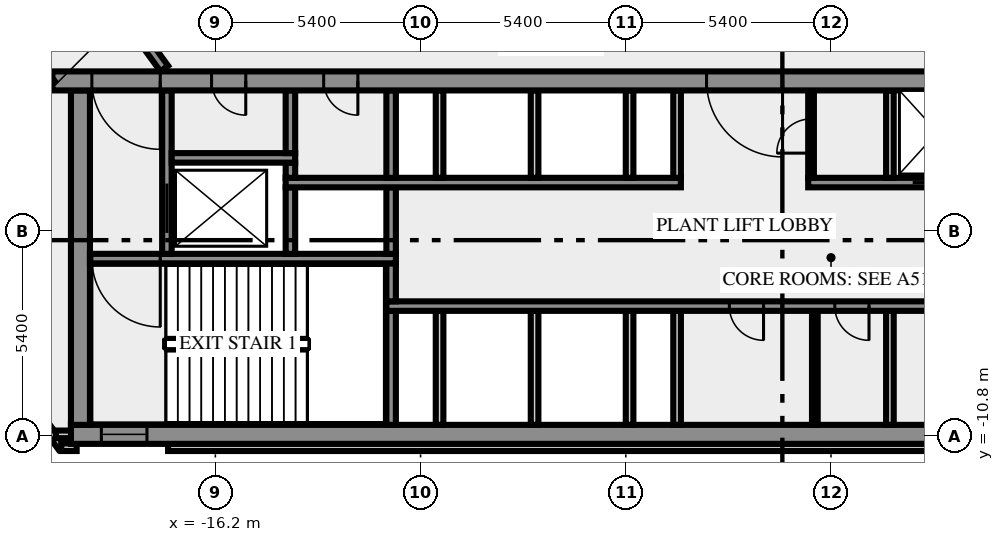
"""IFC4 building model, lengths in metres.
Left out: names, types, materials, properties, quantities, classifications, styles, units other than length and angle.
Written with IfcOpenShell. Run it as: python <this file> out.ifc"""

import sys

from ifc_helpers import new_model, si_unit, direction, frame, frame_2d, origin, place, context, subcontext, project, spatial, rectangle, extrude, element, fill, save


model = new_model("IFC4")
c1 = context("Model", 3, precision=1e-05, world=origin(), true_north=direction((0.0, 1.0)))
c2 = subcontext(c1, "Body", "Model", "MODEL_VIEW")
j1 = project(units=[si_unit("LENGTHUNIT", "METRE"), si_unit("PLANEANGLEUNIT", "RADIAN")], contexts=[c1])
p1 = place(None, origin())
s1 = spatial("IfcSite", under=j1, at=p1, CompositionType="ELEMENT")
p2 = place(p1, origin())
s2 = spatial("IfcBuilding", under=s1, at=p2, CompositionType="ELEMENT")
p3 = place(p2, frame((0.0, 0.0, 301.0)))
s3 = spatial("IfcBuildingStorey", under=s2, at=p3, CompositionType="ELEMENT", Elevation=301.0)
p4 = place(p3, frame((-21.833, -8.909, 0.0), z_axis=(0.0, 0.0, 1.0), x_axis=(0.587766567315, -0.809030569476, 0.0)))
e1 = element("IfcWall", 1, at=p4, inside=s3, PredefinedType="SOLIDWALL", context=c2, shape_type="SweptSolid", body=[
    extrude(rectangle(XDim=2.688, YDim=0.2, at=frame_2d((1.344, 0.0))), origin(), (0.0, 0.0, 1.0), 5.65),
])
p5 = place(p3, frame((-20.256, -11.088, 0.0), z_axis=(0.0, 0.0, 1.0), x_axis=(1.0, 0.0, 0.0)))
e2 = element("IfcWall", 2, at=p5, inside=s3, PredefinedType="SOLIDWALL", context=c2, shape_type="SweptSolid", body=[
    extrude(rectangle(XDim=0.406, YDim=0.2, at=frame_2d((0.203, 0.0))), origin(), (0.0, 0.0, 1.0), 5.65),
])
p6 = place(p3, frame((-17.444, -11.088, 0.0), z_axis=(0.0, 0.0, 1.0), x_axis=(1.0, 0.0, 0.0)))
e3 = element("IfcWall", 3, at=p6, inside=s3, PredefinedType="SOLIDWALL", context=c2, shape_type="SweptSolid", body=[
    extrude(rectangle(XDim=34.888, YDim=0.2, at=frame_2d((17.444, 0.0))), origin(), (0.0, 0.0, 1.0), 5.65),
])
p7 = place(p3, frame((-19.98, -10.75, 0.0), z_axis=(0.0, 0.0, 1.0), x_axis=(-1.0, 0.0, 0.0)))
e4 = element("IfcWall", 4, at=p7, inside=s3, PredefinedType="SOLIDWALL", context=c2, shape_type="SweptSolid", body=[
    extrude(rectangle(XDim=0.417, YDim=0.2, at=frame_2d((0.208, 0.0))), origin(), (0.0, 0.0, 1.0), 5.65),
])
p8 = place(p3, frame((-20.0, -10.75, 0.0), z_axis=(0.0, 0.0, 1.0), x_axis=(1.0, 0.0, 0.0)))
e5 = element("IfcWall", 5, at=p8, inside=s3, PredefinedType="SHEAR", context=c2, shape_type="SweptSolid", body=[
    extrude(rectangle(XDim=40.0, YDim=0.5, at=frame_2d((20.0, 0.0))), origin(), (0.0, 0.0, 1.0), 5.65),
])
p9 = place(p8, frame((0.8, 0.0, 1.0)))
e6 = element("IfcOpeningElement", 6, at=p9, cuts=e5, PredefinedType="OPENING", context=c2, shape_type="SweptSolid", body=[
    extrude(rectangle(XDim=1.2, YDim=1.2, at=frame_2d((0.6, 0.6))), frame((0.0, 0.26, 0.0), z_axis=(0.0, -1.0, 0.0), x_axis=(1.0, 0.0, 0.0)), (0.0, 0.0, 1.0), 0.52),
])
p10 = place(p8, frame((38.0, 0.0, 1.0)))
e7 = element("IfcOpeningElement", 7, at=p10, cuts=e5, PredefinedType="OPENING", context=c2, shape_type="SweptSolid", body=[
    extrude(rectangle(XDim=1.2, YDim=1.2, at=frame_2d((0.6, 0.6))), frame((0.0, 0.26, 0.0), z_axis=(0.0, -1.0, 0.0), x_axis=(1.0, 0.0, 0.0)), (0.0, 0.0, 1.0), 0.52),
])
p11 = place(p3, frame((-19.75, -10.5, 0.0), z_axis=(0.0, 0.0, 1.0), x_axis=(0.0, 1.0, 0.0)))
e8 = element("IfcWall", 8, at=p11, inside=s3, PredefinedType="SHEAR", context=c2, shape_type="SweptSolid", body=[
    extrude(rectangle(XDim=8.8, YDim=0.5, at=frame_2d((4.4, 0.0))), origin(), (0.0, 0.0, 1.0), 5.65),
])
p12 = place(p3, frame((-11.575, -10.5, 0.0), z_axis=(0.0, 0.0, 1.0), x_axis=(0.0, 1.0, 0.0)))
e9 = element("IfcWall", 9, at=p12, inside=s3, PredefinedType="SHEAR", context=c2, shape_type="SweptSolid", body=[
    extrude(rectangle(XDim=3.0, YDim=0.25, at=frame_2d((1.5, 0.0))), origin(), (0.0, 0.0, 1.0), 5.65),
])
for number, where, z_axis, x_axis in (
    (10, (-10.3, -10.5, 0.0), (0.0, 0.0, 1.0), (0.0, 1.0, 0.0)),
    (11, (-7.8, -10.5, 0.0), (0.0, 0.0, 1.0), (0.0, 1.0, 0.0)),
    (12, (-5.3, -10.5, 0.0), (0.0, 0.0, 1.0), (0.0, 1.0, 0.0)),
    (13, (-4.05, -10.5, 0.0), (0.0, 0.0, 1.0), (0.0, 1.0, 0.0)),
):
    element("IfcWall", number, at=place(p3, frame(where, z_axis=z_axis, x_axis=x_axis)), inside=s3, PredefinedType="SOLIDWALL", context=c2, shape_type="SweptSolid", body=[
        extrude(rectangle(XDim=3.0, YDim=0.2, at=frame_2d((1.5, 0.0))), origin(), (0.0, 0.0, 1.0), 5.65),
    ])
p13 = place(p3, frame((-0.425, -10.5, 0.0), z_axis=(0.0, 0.0, 1.0), x_axis=(0.0, 1.0, 0.0)))
e14 = element("IfcWall", 14, at=p13, inside=s3, PredefinedType="PARTITIONING", context=c2, shape_type="SweptSolid", body=[
    extrude(rectangle(XDim=3.0, YDim=0.15, at=frame_2d((1.5, 0.0))), origin(), (0.0, 0.0, 1.0), 5.65),
])
p14 = place(p3, frame((1.55, -10.5, 0.0), z_axis=(0.0, 0.0, 1.0), x_axis=(0.0, 1.0, 0.0)))
e15 = element("IfcWall", 15, at=p14, inside=s3, PredefinedType="SOLIDWALL", context=c2, shape_type="SweptSolid", body=[
    extrude(rectangle(XDim=3.0, YDim=0.2, at=frame_2d((1.5, 0.0))), origin(), (0.0, 0.0, 1.0), 5.65),
])
p15 = place(p3, frame((11.7, -7.375, 0.0), z_axis=(0.0, 0.0, 1.0), x_axis=(-1.0, 0.0, 0.0)))
e16 = element("IfcWall", 16, at=p15, inside=s3, PredefinedType="SHEAR", context=c2, shape_type="SweptSolid", body=[
    extrude(rectangle(XDim=23.4, YDim=0.25, at=frame_2d((11.7, 0.0))), origin(), (0.0, 0.0, 1.0), 5.65),
])
p16 = place(p15, frame((13.475, 0.0, 0.0)))
e17 = element("IfcOpeningElement", 17, at=p16, cuts=e16, PredefinedType="OPENING", context=c2, shape_type="SweptSolid", body=[
    extrude(rectangle(XDim=0.9, YDim=2.1, at=frame_2d((0.45, 1.05))), frame((0.0, 0.135, 0.0), z_axis=(0.0, -1.0, 0.0), x_axis=(1.0, 0.0, 0.0)), (0.0, 0.0, 1.0), 0.27),
])
p17 = place(p15, frame((10.7, 0.0, 0.0)))
e18 = element("IfcOpeningElement", 18, at=p17, cuts=e16, PredefinedType="OPENING", context=c2, shape_type="SweptSolid", body=[
    extrude(rectangle(XDim=0.9, YDim=2.1, at=frame_2d((0.45, 1.05))), frame((0.0, 0.135, 0.0), z_axis=(0.0, -1.0, 0.0), x_axis=(1.0, 0.0, 0.0)), (0.0, 0.0, 1.0), 0.27),
])
p18 = place(p15, frame((7.6, 0.0, 0.0)))
e19 = element("IfcOpeningElement", 19, at=p18, cuts=e16, PredefinedType="OPENING", context=c2, shape_type="SweptSolid", body=[
    extrude(rectangle(XDim=0.9, YDim=2.1, at=frame_2d((0.45, 1.05))), frame((0.0, 0.135, 0.0), z_axis=(0.0, -1.0, 0.0), x_axis=(1.0, 0.0, 0.0)), (0.0, 0.0, 1.0), 0.27),
])
p19 = place(p15, frame((2.338, 0.0, 0.0)))
e20 = element("IfcOpeningElement", 20, at=p19, cuts=e16, PredefinedType="OPENING", context=c2, shape_type="SweptSolid", body=[
    extrude(rectangle(XDim=0.9, YDim=2.1, at=frame_2d((0.45, 1.05))), frame((0.0, 0.135, 0.0), z_axis=(0.0, -1.0, 0.0), x_axis=(1.0, 0.0, 0.0)), (0.0, 0.0, 1.0), 0.27),
])
p20 = place(p3, frame((-11.575, -7.25, 0.0), z_axis=(0.0, 0.0, 1.0), x_axis=(0.0, 1.0, 0.0)))
e21 = element("IfcWall", 21, at=p20, inside=s3, PredefinedType="SHEAR", context=c2, shape_type="SweptSolid", body=[
    extrude(rectangle(XDim=1.0, YDim=0.25, at=frame_2d((0.5, 0.0))), origin(), (0.0, 0.0, 1.0), 5.65),
])
p21 = place(p3, frame((-11.45, -6.125, 0.0), z_axis=(0.0, 0.0, 1.0), x_axis=(-1.0, 0.0, 0.0)))
e22 = element("IfcWall", 22, at=p21, inside=s3, PredefinedType="SHEAR", context=c2, shape_type="SweptSolid", body=[
    extrude(rectangle(XDim=8.05, YDim=0.25, at=frame_2d((4.025, 0.0))), origin(), (0.0, 0.0, 1.0), 5.65),
])
p22 = place(p21, frame((6.2, 0.0, 0.0)))
e23 = element("IfcOpeningElement", 23, at=p22, cuts=e22, PredefinedType="OPENING", context=c2, shape_type="SweptSolid", body=[
    extrude(rectangle(XDim=1.8, YDim=2.1, at=frame_2d((0.9, 1.05))), frame((0.0, 0.135, 0.0), z_axis=(0.0, -1.0, 0.0), x_axis=(1.0, 0.0, 0.0)), (0.0, 0.0, 1.0), 0.27),
])
p23 = place(p3, frame((-17.475, -6.0, 0.0), z_axis=(0.0, 0.0, 1.0), x_axis=(0.0, 1.0, 0.0)))
e24 = element("IfcWall", 24, at=p23, inside=s3, PredefinedType="SHEAR", context=c2, shape_type="SweptSolid", body=[
    extrude(rectangle(XDim=4.3, YDim=0.25, at=frame_2d((2.15, 0.0))), origin(), (0.0, 0.0, 1.0), 5.65),
])
p24 = place(p23, frame((0.55, 0.0, 0.0)))
e25 = element("IfcOpeningElement", 25, at=p24, cuts=e24, PredefinedType="OPENING", context=c2, shape_type="SweptSolid", body=[
    extrude(rectangle(XDim=1.3, YDim=2.1, at=frame_2d((0.65, 1.05))), frame((0.0, 0.135, 0.0), z_axis=(0.0, -1.0, 0.0), x_axis=(1.0, 0.0, 0.0)), (0.0, 0.0, 1.0), 0.27),
])
for number, where, z_axis, x_axis in (
    (26, (-14.225, -6.0, 0.0), (0.0, 0.0, 1.0), (0.0, 1.0, 0.0)),
    (27, (-11.575, -6.0, 0.0), (0.0, 0.0, 1.0), (0.0, 1.0, 0.0)),
):
    element("IfcWall", number, at=place(p3, frame(where, z_axis=z_axis, x_axis=x_axis)), inside=s3, PredefinedType="SHEAR", context=c2, shape_type="SweptSolid", body=[
        extrude(rectangle(XDim=1.75, YDim=0.25, at=frame_2d((0.875, 0.0))), origin(), (0.0, 0.0, 1.0), 5.65),
    ])
p25 = place(p3, frame((-14.35, -4.125, 0.0), z_axis=(0.0, 0.0, 1.0), x_axis=(1.0, 0.0, 0.0)))
e28 = element("IfcWall", 28, at=p25, inside=s3, PredefinedType="SHEAR", context=c2, shape_type="SweptSolid", body=[
    extrude(rectangle(XDim=10.4, YDim=0.25, at=frame_2d((5.2, 0.0))), origin(), (0.0, 0.0, 1.0), 5.65),
])
p26 = place(p3, frame((-0.6, -4.125, 0.0), z_axis=(0.0, 0.0, 1.0), x_axis=(1.0, 0.0, 0.0)))
e29 = element("IfcWall", 29, at=p26, inside=s3, PredefinedType="SHEAR", context=c2, shape_type="SweptSolid", body=[
    extrude(rectangle(XDim=14.95, YDim=0.25, at=frame_2d((7.475, 0.0))), origin(), (0.0, 0.0, 1.0), 5.65),
])
p27 = place(p26, frame((2.75, 0.0, 0.0)))
e30 = element("IfcOpeningElement", 30, at=p27, cuts=e29, PredefinedType="OPENING", context=c2, shape_type="SweptSolid", body=[
    extrude(rectangle(XDim=1.3, YDim=2.1, at=frame_2d((0.65, 1.05))), frame((0.0, 0.135, 0.0), z_axis=(0.0, -1.0, 0.0), x_axis=(1.0, 0.0, 0.0)), (0.0, 0.0, 1.0), 0.27),
])
p28 = place(p3, frame((-14.225, -4.0, 0.0), z_axis=(0.0, 0.0, 1.0), x_axis=(0.0, 1.0, 0.0)))
e31 = element("IfcWall", 31, at=p28, inside=s3, PredefinedType="SHEAR", context=c2, shape_type="SweptSolid", body=[
    extrude(rectangle(XDim=0.4, YDim=0.25, at=frame_2d((0.2, 0.0))), origin(), (0.0, 0.0, 1.0), 5.65),
])
p29 = place(p3, frame((-11.575, -4.0, 0.0), z_axis=(0.0, 0.0, 1.0), x_axis=(0.0, 1.0, 0.0)))
e32 = element("IfcWall", 32, at=p29, inside=s3, PredefinedType="SHEAR", context=c2, shape_type="SweptSolid", body=[
    extrude(rectangle(XDim=2.3, YDim=0.25, at=frame_2d((1.15, 0.0))), origin(), (0.0, 0.0, 1.0), 5.65),
])
for number, where, z_axis, x_axis in (
    (33, (-10.3, -4.0, 0.0), (0.0, 0.0, 1.0), (0.0, 1.0, 0.0)),
    (34, (-7.8, -4.0, 0.0), (0.0, 0.0, 1.0), (0.0, 1.0, 0.0)),
    (35, (-5.3, -4.0, 0.0), (0.0, 0.0, 1.0), (0.0, 1.0, 0.0)),
    (36, (-4.05, -4.0, 0.0), (0.0, 0.0, 1.0), (0.0, 1.0, 0.0)),
):
    element("IfcWall", number, at=place(p3, frame(where, z_axis=z_axis, x_axis=x_axis)), inside=s3, PredefinedType="SOLIDWALL", context=c2, shape_type="SweptSolid", body=[
        extrude(rectangle(XDim=2.3, YDim=0.2, at=frame_2d((1.15, 0.0))), origin(), (0.0, 0.0, 1.0), 5.65),
    ])
p30 = place(p3, frame((-0.525, -4.0, 0.0), z_axis=(0.0, 0.0, 1.0), x_axis=(0.0, 1.0, 0.0)))
e37 = element("IfcWall", 37, at=p30, inside=s3, PredefinedType="PARTITIONING", context=c2, shape_type="SweptSolid", body=[
    extrude(rectangle(XDim=2.3, YDim=0.15, at=frame_2d((1.15, 0.0))), origin(), (0.0, 0.0, 1.0), 5.65),
])
p31 = place(p30, frame((0.65, 0.0, 0.0)))
e38 = element("IfcOpeningElement", 38, at=p31, cuts=e37, PredefinedType="OPENING", context=c2, shape_type="SweptSolid", body=[
    extrude(rectangle(XDim=0.9, YDim=2.1, at=frame_2d((0.45, 1.05))), frame((0.0, 0.085, 0.0), z_axis=(0.0, -1.0, 0.0), x_axis=(1.0, 0.0, 0.0)), (0.0, 0.0, 1.0), 0.17),
])
p32 = place(p3, frame((1.55, -4.0, 0.0), z_axis=(0.0, 0.0, 1.0), x_axis=(0.0, 1.0, 0.0)))
e39 = element("IfcWall", 39, at=p32, inside=s3, PredefinedType="SOLIDWALL", context=c2, shape_type="SweptSolid", body=[
    extrude(rectangle(XDim=2.3, YDim=0.2, at=frame_2d((1.15, 0.0))), origin(), (0.0, 0.0, 1.0), 5.65),
])
p33 = place(p3, frame((-17.35, -3.475, 0.0), z_axis=(0.0, 0.0, 1.0), x_axis=(1.0, 0.0, 0.0)))
e40 = element("IfcWall", 40, at=p33, inside=s3, PredefinedType="SHEAR", context=c2, shape_type="SweptSolid", body=[
    extrude(rectangle(XDim=3.25, YDim=0.25, at=frame_2d((1.625, 0.0))), origin(), (0.0, 0.0, 1.0), 5.65),
])
p34 = place(p3, frame((-14.225, -3.35, 0.0), z_axis=(0.0, 0.0, 1.0), x_axis=(0.0, 1.0, 0.0)))
e41 = element("IfcWall", 41, at=p34, inside=s3, PredefinedType="SHEAR", context=c2, shape_type="SweptSolid", body=[
    extrude(rectangle(XDim=1.65, YDim=0.25, at=frame_2d((0.825, 0.0))), origin(), (0.0, 0.0, 1.0), 5.65),
])
p35 = place(p3, frame((20.49, -1.45, 0.0), z_axis=(0.0, 0.0, 1.0), x_axis=(-1.0, 0.0, 0.0)))
e42 = element("IfcWall", 42, at=p35, inside=s3, PredefinedType="SHEAR", context=c2, shape_type="SweptSolid", body=[
    extrude(rectangle(XDim=40.98, YDim=0.5, at=frame_2d((20.49, 0.0))), origin(), (0.0, 0.0, 1.0), 5.65),
])
p36 = place(p35, frame((38.14, 0.0, 0.0)))
e43 = element("IfcOpeningElement", 43, at=p36, cuts=e42, PredefinedType="OPENING", context=c2, shape_type="SweptSolid", body=[
    extrude(rectangle(XDim=1.8, YDim=2.1, at=frame_2d((0.9, 1.05))), frame((0.0, 0.26, 0.0), z_axis=(0.0, -1.0, 0.0), x_axis=(1.0, 0.0, 0.0)), (0.0, 0.0, 1.0), 0.52),
])
p37 = place(p35, frame((35.89, 0.0, 0.0)))
e44 = element("IfcOpeningElement", 44, at=p37, cuts=e42, PredefinedType="OPENING", context=c2, shape_type="SweptSolid", body=[
    extrude(rectangle(XDim=0.9, YDim=2.1, at=frame_2d((0.45, 1.05))), frame((0.0, 0.26, 0.0), z_axis=(0.0, -1.0, 0.0), x_axis=(1.0, 0.0, 0.0)), (0.0, 0.0, 1.0), 0.52),
])
p38 = place(p35, frame((32.94, 0.0, 0.0)))
e45 = element("IfcOpeningElement", 45, at=p38, cuts=e42, PredefinedType="OPENING", context=c2, shape_type="SweptSolid", body=[
    extrude(rectangle(XDim=0.9, YDim=2.1, at=frame_2d((0.45, 1.05))), frame((0.0, 0.26, 0.0), z_axis=(0.0, -1.0, 0.0), x_axis=(1.0, 0.0, 0.0)), (0.0, 0.0, 1.0), 0.52),
])
p39 = place(p35, frame((21.765, 0.0, 0.0)))
e46 = element("IfcOpeningElement", 46, at=p39, cuts=e42, PredefinedType="OPENING", context=c2, shape_type="SweptSolid", body=[
    extrude(rectangle(XDim=2.0, YDim=2.1, at=frame_2d((1.0, 1.05))), frame((0.0, 0.26, 0.0), z_axis=(0.0, -1.0, 0.0), x_axis=(1.0, 0.0, 0.0)), (0.0, 0.0, 1.0), 0.52),
])
p40 = place(p35, frame((14.903, 0.0, 0.0)))
e47 = element("IfcOpeningElement", 47, at=p40, cuts=e42, PredefinedType="OPENING", context=c2, shape_type="SweptSolid", body=[
    extrude(rectangle(XDim=0.9, YDim=2.1, at=frame_2d((0.45, 1.05))), frame((0.0, 0.26, 0.0), z_axis=(0.0, -1.0, 0.0), x_axis=(1.0, 0.0, 0.0)), (0.0, 0.0, 1.0), 0.52),
])
p41 = place(p35, frame((12.54, 0.0, 0.0)))
e48 = element("IfcOpeningElement", 48, at=p41, cuts=e42, PredefinedType="OPENING", context=c2, shape_type="SweptSolid", body=[
    extrude(rectangle(XDim=0.9, YDim=2.1, at=frame_2d((0.45, 1.05))), frame((0.0, 0.26, 0.0), z_axis=(0.0, -1.0, 0.0), x_axis=(1.0, 0.0, 0.0)), (0.0, 0.0, 1.0), 0.52),
])
p42 = place(p35, frame((9.877, 0.0, 0.0)))
e49 = element("IfcOpeningElement", 49, at=p42, cuts=e42, PredefinedType="OPENING", context=c2, shape_type="SweptSolid", body=[
    extrude(rectangle(XDim=0.9, YDim=2.1, at=frame_2d((0.45, 1.05))), frame((0.0, 0.26, 0.0), z_axis=(0.0, -1.0, 0.0), x_axis=(1.0, 0.0, 0.0)), (0.0, 0.0, 1.0), 0.52),
])
p43 = place(p35, frame((7.14, 0.0, 0.0)))
e50 = element("IfcOpeningElement", 50, at=p43, cuts=e42, PredefinedType="OPENING", context=c2, shape_type="SweptSolid", body=[
    extrude(rectangle(XDim=0.9, YDim=2.1, at=frame_2d((0.45, 1.05))), frame((0.0, 0.26, 0.0), z_axis=(0.0, -1.0, 0.0), x_axis=(1.0, 0.0, 0.0)), (0.0, 0.0, 1.0), 0.52),
])
p44 = place(p35, frame((5.028, 0.0, 0.0)))
e51 = element("IfcOpeningElement", 51, at=p44, cuts=e42, PredefinedType="OPENING", context=c2, shape_type="SweptSolid", body=[
    extrude(rectangle(XDim=0.8, YDim=2.1, at=frame_2d((0.4, 1.05))), frame((0.0, 0.26, 0.0), z_axis=(0.0, -1.0, 0.0), x_axis=(1.0, 0.0, 0.0)), (0.0, 0.0, 1.0), 0.52),
])
p45 = place(p35, frame((3.452, 0.0, 0.0)))
e52 = element("IfcOpeningElement", 52, at=p45, cuts=e42, PredefinedType="OPENING", context=c2, shape_type="SweptSolid", body=[
    extrude(rectangle(XDim=0.8, YDim=2.1, at=frame_2d((0.4, 1.05))), frame((0.0, 0.26, 0.0), z_axis=(0.0, -1.0, 0.0), x_axis=(1.0, 0.0, 0.0)), (0.0, 0.0, 1.0), 0.52),
])
p46 = place(p35, frame((1.04, 0.0, 0.0)))
e53 = element("IfcOpeningElement", 53, at=p46, cuts=e42, PredefinedType="OPENING", context=c2, shape_type="SweptSolid", body=[
    extrude(rectangle(XDim=1.8, YDim=2.1, at=frame_2d((0.9, 1.05))), frame((0.0, 0.26, 0.0), z_axis=(0.0, -1.0, 0.0), x_axis=(1.0, 0.0, 0.0)), (0.0, 0.0, 1.0), 0.52),
])
p47 = place(p3, frame((-20.531, -1.523, 0.0), z_axis=(0.0, 0.0, 1.0), x_axis=(-0.587782114023, 0.809019274452, 0.0)))
e54 = element("IfcWall", 54, at=p47, inside=s3, PredefinedType="SOLIDWALL", context=c2, shape_type="SweptSolid", body=[
    extrude(rectangle(XDim=22.212, YDim=0.25, at=frame_2d((11.106, 0.0))), origin(), (0.0, 0.0, 1.0), 5.65),
])
p48 = place(p47, frame((0.533, 0.0, 0.0)))
e55 = element("IfcOpeningElement", 55, at=p48, cuts=e54, PredefinedType="OPENING", context=c2, shape_type="SweptSolid", body=[
    extrude(rectangle(XDim=1.2, YDim=2.1, at=frame_2d((0.6, 1.05))), frame((0.0, 0.135, 0.0), z_axis=(0.0, -1.0, 0.0), x_axis=(1.0, 0.0, 0.0)), (0.0, 0.0, 1.0), 0.27),
])
p49 = place(p3, frame((-31.387, 17.927, 0.0), z_axis=(0.0, 0.0, 1.0), x_axis=(0.587788830132, -0.80901439491, 0.0)))
e56 = element("IfcWall", 56, at=p49, inside=s3, PredefinedType="SOLIDWALL", context=c2, shape_type="SweptSolid", body=[
    extrude(rectangle(XDim=23.549, YDim=0.25, at=frame_2d((11.775, 0.0))), origin(), (0.0, 0.0, 1.0), 5.65),
])
p50 = place(p49, frame((1.046, 0.0, 0.0)))
e57 = element("IfcOpeningElement", 57, at=p50, cuts=e56, PredefinedType="OPENING", context=c2, shape_type="SweptSolid", body=[
    extrude(rectangle(XDim=1.2, YDim=2.1, at=frame_2d((0.6, 1.05))), frame((0.0, 0.135, 0.0), z_axis=(0.0, -1.0, 0.0), x_axis=(1.0, 0.0, 0.0)), (0.0, 0.0, 1.0), 0.27),
])
p51 = place(p9, origin())
e58 = element("IfcWindow", 58, at=p51, inside=s3, PartitioningType="SINGLE_PANEL", PredefinedType="WINDOW", context=c2, shape_type="SweptSolid", body=[
    extrude(rectangle(XDim=1.2, YDim=1.2, at=frame_2d((0.6, 0.6))), frame((0.0, 0.03, 0.0), z_axis=(0.0, -1.0, 0.0), x_axis=(1.0, 0.0, 0.0)), (0.0, 0.0, 1.0), 0.06),
])
fill(e6, e58)
p52 = place(p16, origin())
e59 = element("IfcDoor", 59, at=p52, inside=s3, OperationType="SINGLE_SWING_RIGHT", PredefinedType="DOOR", context=c2, shape_type="SweptSolid", body=[
    extrude(rectangle(XDim=0.9, YDim=2.1, at=frame_2d((0.45, 1.05))), frame((0.0, 0.025, 0.0), z_axis=(0.0, -1.0, 0.0), x_axis=(1.0, 0.0, 0.0)), (0.0, 0.0, 1.0), 0.05),
])
fill(e17, e59)
p53 = place(p17, origin())
e60 = element("IfcDoor", 60, at=p53, inside=s3, OperationType="SINGLE_SWING_LEFT", PredefinedType="DOOR", context=c2, shape_type="SweptSolid", body=[
    extrude(rectangle(XDim=0.9, YDim=2.1, at=frame_2d((0.45, 1.05))), frame((0.0, 0.025, 0.0), z_axis=(0.0, -1.0, 0.0), x_axis=(1.0, 0.0, 0.0)), (0.0, 0.0, 1.0), 0.05),
])
fill(e18, e60)
p54 = place(p22, origin())
e61 = element("IfcDoor", 61, at=p54, inside=s3, OperationType="DOUBLE_DOOR_SINGLE_SWING", PredefinedType="DOOR", context=c2, shape_type="SweptSolid", body=[
    extrude(rectangle(XDim=1.8, YDim=2.1, at=frame_2d((0.9, 1.05))), frame((0.0, 0.025, 0.0), z_axis=(0.0, -1.0, 0.0), x_axis=(1.0, 0.0, 0.0)), (0.0, 0.0, 1.0), 0.05),
])
fill(e23, e61)
p55 = place(p24, origin())
e62 = element("IfcDoor", 62, at=p55, inside=s3, OperationType="DOUBLE_DOOR_SLIDING", PredefinedType="DOOR", context=c2, shape_type="SweptSolid", body=[
    extrude(rectangle(XDim=1.3, YDim=2.1, at=frame_2d((0.65, 1.05))), frame((0.0, 0.025, 0.0), z_axis=(0.0, -1.0, 0.0), x_axis=(1.0, 0.0, 0.0)), (0.0, 0.0, 1.0), 0.05),
])
fill(e25, e62)
p56 = place(p27, origin())
e63 = element("IfcDoor", 63, at=p56, inside=s3, OperationType="DOUBLE_DOOR_SLIDING", PredefinedType="DOOR", context=c2, shape_type="SweptSolid", body=[
    extrude(rectangle(XDim=1.3, YDim=2.1, at=frame_2d((0.65, 1.05))), frame((0.0, 0.025, 0.0), z_axis=(0.0, -1.0, 0.0), x_axis=(1.0, 0.0, 0.0)), (0.0, 0.0, 1.0), 0.05),
])
fill(e30, e63)
p57 = place(p31, origin())
e64 = element("IfcDoor", 64, at=p57, inside=s3, OperationType="SINGLE_SWING_LEFT", PredefinedType="DOOR", context=c2, shape_type="SweptSolid", body=[
    extrude(rectangle(XDim=0.9, YDim=2.1, at=frame_2d((0.45, 1.05))), frame((0.0, 0.025, 0.0), z_axis=(0.0, -1.0, 0.0), x_axis=(1.0, 0.0, 0.0)), (0.0, 0.0, 1.0), 0.05),
])
fill(e38, e64)
p58 = place(p36, origin())
e65 = element("IfcDoor", 65, at=p58, inside=s3, OperationType="DOUBLE_DOOR_SINGLE_SWING", PredefinedType="DOOR", context=c2, shape_type="SweptSolid", body=[
    extrude(rectangle(XDim=1.8, YDim=2.1, at=frame_2d((0.9, 1.05))), frame((0.0, 0.025, 0.0), z_axis=(0.0, -1.0, 0.0), x_axis=(1.0, 0.0, 0.0)), (0.0, 0.0, 1.0), 0.05),
])
fill(e43, e65)
p59 = place(p37, origin())
e66 = element("IfcDoor", 66, at=p59, inside=s3, OperationType="SINGLE_SWING_RIGHT", PredefinedType="DOOR", context=c2, shape_type="SweptSolid", body=[
    extrude(rectangle(XDim=0.9, YDim=2.1, at=frame_2d((0.45, 1.05))), frame((0.0, 0.025, 0.0), z_axis=(0.0, -1.0, 0.0), x_axis=(1.0, 0.0, 0.0)), (0.0, 0.0, 1.0), 0.05),
])
fill(e44, e66)
p60 = place(p38, origin())
e67 = element("IfcDoor", 67, at=p60, inside=s3, OperationType="SINGLE_SWING_RIGHT", PredefinedType="DOOR", context=c2, shape_type="SweptSolid", body=[
    extrude(rectangle(XDim=0.9, YDim=2.1, at=frame_2d((0.45, 1.05))), frame((0.0, 0.025, 0.0), z_axis=(0.0, -1.0, 0.0), x_axis=(1.0, 0.0, 0.0)), (0.0, 0.0, 1.0), 0.05),
])
fill(e45, e67)
p61 = place(p39, origin())
e68 = element("IfcDoor", 68, at=p61, inside=s3, OperationType="DOUBLE_DOOR_SINGLE_SWING", PredefinedType="DOOR", context=c2, shape_type="SweptSolid", body=[
    extrude(rectangle(XDim=2.0, YDim=2.1, at=frame_2d((1.0, 1.05))), frame((0.0, 0.025, 0.0), z_axis=(0.0, -1.0, 0.0), x_axis=(1.0, 0.0, 0.0)), (0.0, 0.0, 1.0), 0.05),
])
fill(e46, e68)
save(model, sys.argv[1])
